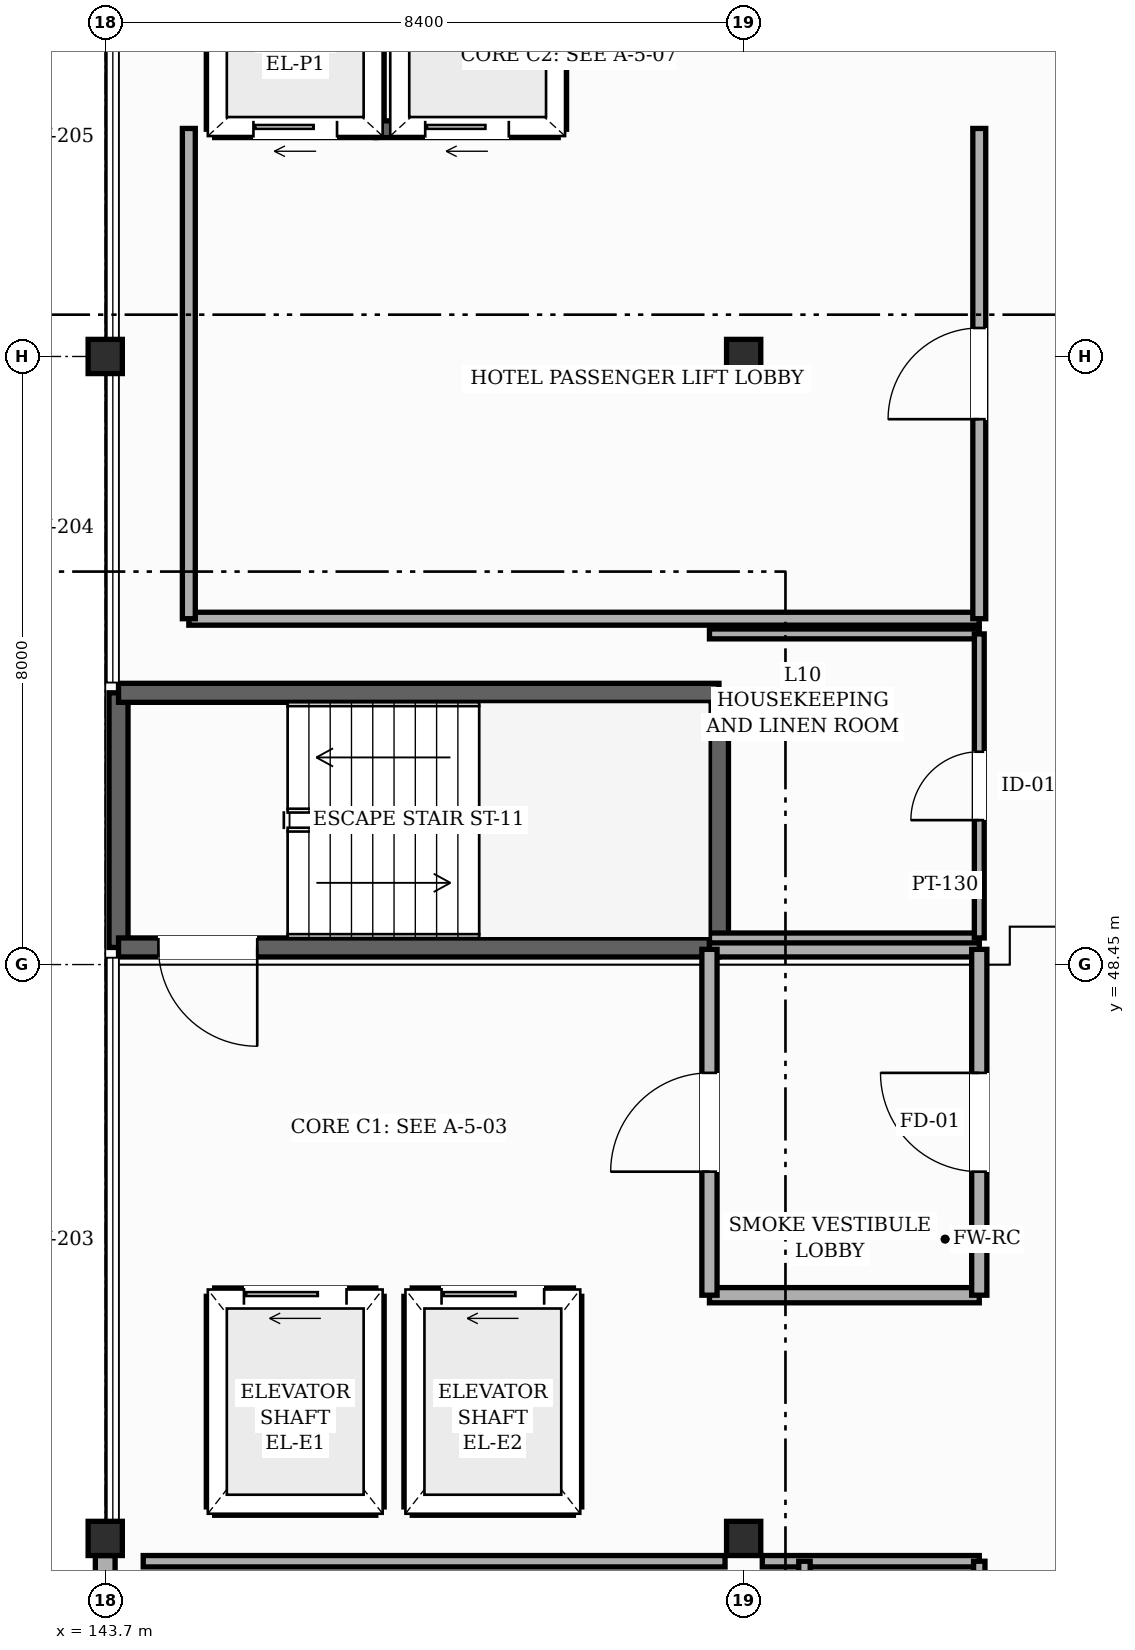
"""IFC4 building model, lengths in metres.
Left out: names, types, materials, properties, quantities, classifications, styles, units other than length and angle.
Written with IfcOpenShell. Run it as: python <this file> out.ifc"""

import sys

from ifc_helpers import new_model, si_unit, direction, frame, frame_2d, origin, origin_2d, place, context, subcontext, project, spatial, rectangle, hollow_rectangle, extrude, element, fill, save


model = new_model("IFC4")
c1 = context("Model", 3, precision=1e-05, world=origin(), true_north=direction((0.0, 1.0)))
c2 = subcontext(c1, "Body", "Model", "MODEL_VIEW")
j1 = project(units=[si_unit("LENGTHUNIT", "METRE"), si_unit("PLANEANGLEUNIT", "RADIAN")], contexts=[c1])
p1 = place(None, origin())
s1 = spatial("IfcSite", under=j1, at=p1, CompositionType="ELEMENT")
p2 = place(p1, origin())
s2 = spatial("IfcBuilding", under=s1, at=p2, CompositionType="ELEMENT")
p3 = place(p2, frame((0.0, 0.0, 42.6)))
s3 = spatial("IfcBuildingStorey", under=s2, at=p3, CompositionType="ELEMENT", Elevation=42.6)
for number, where, z_axis, x_axis in (
    (1, (143.7, 40.9, 0.0), (0.0, 0.0, 1.0), (1.0, 0.0, 0.0)),
    (2, (143.7, 56.45, 0.0), (0.0, 0.0, 1.0), (1.0, 0.0, 0.0)),
    (3, (152.1, 40.9, 0.0), (0.0, 0.0, 1.0), (1.0, 0.0, 0.0)),
    (4, (152.1, 56.45, 0.0), (0.0, 0.0, 1.0), (1.0, 0.0, 0.0)),
):
    element("IfcColumn", number, at=place(p3, frame(where, z_axis=z_axis, x_axis=x_axis)), inside=s3, PredefinedType="COLUMN", context=c2, shape_type="SweptSolid", body=[
        extrude(hollow_rectangle(XDim=0.45, YDim=0.45, WallThickness=0.019, InnerFilletRadius=0.019, OuterFilletRadius=0.038, at=origin_2d()), origin(), (0.0, 0.0, 1.0), 3.6),
    ])
p4 = place(p3, frame((143.7, 32.225, 0.0), z_axis=(0.0, 0.0, 1.0), x_axis=(0.0, 1.0, 0.0)))
e5 = element("IfcWall", 5, at=p4, inside=s3, PredefinedType="SOLIDWALL", context=c2, shape_type="SweptSolid", body=[
    extrude(rectangle(XDim=8.45, YDim=0.26, at=frame_2d((4.225, 0.0))), origin(), (0.0, 0.0, 1.0), 2.655),
])
p5 = place(p4, frame((0.875, 0.0, 0.85)))
e6 = element("IfcOpeningElement", 6, at=p5, cuts=e5, PredefinedType="OPENING", context=c2, shape_type="SweptSolid", body=[
    extrude(rectangle(XDim=2.25, YDim=1.35, at=frame_2d((1.125, 0.675))), frame((0.0, 0.14, 0.0), z_axis=(0.0, -1.0, 0.0), x_axis=(1.0, 0.0, 0.0)), (0.0, 0.0, 1.0), 0.28),
])
p6 = place(p4, frame((3.925, 0.0, 0.85)))
e7 = element("IfcOpeningElement", 7, at=p6, cuts=e5, PredefinedType="OPENING", context=c2, shape_type="SweptSolid", body=[
    extrude(rectangle(XDim=1.25, YDim=1.35, at=frame_2d((0.625, 0.675))), frame((0.0, 0.14, 0.0), z_axis=(0.0, -1.0, 0.0), x_axis=(1.0, 0.0, 0.0)), (0.0, 0.0, 1.0), 0.28),
])
p7 = place(p4, frame((6.375, 0.0, 0.85)))
e8 = element("IfcOpeningElement", 8, at=p7, cuts=e5, PredefinedType="OPENING", context=c2, shape_type="SweptSolid", body=[
    extrude(rectangle(XDim=1.45, YDim=1.35, at=frame_2d((0.725, 0.675))), frame((0.0, 0.14, 0.0), z_axis=(0.0, -1.0, 0.0), x_axis=(1.0, 0.0, 0.0)), (0.0, 0.0, 1.0), 0.28),
])
for number, where, z_axis, x_axis in (
    (9, (143.875, 48.675, 0.0), (0.0, 0.0, 1.0), (0.0, 1.0, 0.0)),
    (10, (151.775, 52.025, 0.0), (0.0, 0.0, 1.0), (0.0, -1.0, 0.0)),
):
    element("IfcWall", number, at=place(p3, frame(where, z_axis=z_axis, x_axis=x_axis)), inside=s3, PredefinedType="SHEAR", context=c2, shape_type="SweptSolid", body=[
        extrude(rectangle(XDim=3.35, YDim=0.25, at=frame_2d((1.675, 0.0))), origin(), (0.0, 0.0, 1.0), 3.38),
    ])
p8 = place(p3, frame((151.775, 48.675, 0.0), z_axis=(0.0, 0.0, 1.0), x_axis=(-1.0, 0.0, 0.0)))
e11 = element("IfcWall", 11, at=p8, inside=s3, PredefinedType="SHEAR", context=c2, shape_type="SweptSolid", body=[
    extrude(rectangle(XDim=7.9, YDim=0.25, at=frame_2d((3.95, 0.0))), origin(), (0.0, 0.0, 1.0), 3.38),
])
p9 = place(p8, frame((6.075, 0.0, 0.0)))
e12 = element("IfcOpeningElement", 12, at=p9, cuts=e11, PredefinedType="OPENING", context=c2, shape_type="SweptSolid", body=[
    extrude(rectangle(XDim=1.3, YDim=2.2, at=frame_2d((0.65, 1.1))), frame((0.0, 0.135, 0.0), z_axis=(0.0, -1.0, 0.0), x_axis=(1.0, 0.0, 0.0)), (0.0, 0.0, 1.0), 0.27),
])
p10 = place(p3, frame((143.875, 52.025, 0.0), z_axis=(0.0, 0.0, 1.0), x_axis=(1.0, 0.0, 0.0)))
e13 = element("IfcWall", 13, at=p10, inside=s3, PredefinedType="SHEAR", context=c2, shape_type="SweptSolid", body=[
    extrude(rectangle(XDim=7.9, YDim=0.25, at=frame_2d((3.95, 0.0))), origin(), (0.0, 0.0, 1.0), 3.38),
])
p11 = place(p3, frame((145.14, 44.085, 0.0), z_axis=(0.0, 0.0, 1.0), x_axis=(1.0, 0.0, 0.0)))
e14 = element("IfcWall", 14, at=p11, inside=s3, PredefinedType="SHEAR", context=c2, shape_type="SweptSolid", body=[
    extrude(rectangle(XDim=2.12, YDim=0.22, at=frame_2d((1.06, 0.0))), origin(), (0.0, 0.0, 1.0), 3.38),
])
p12 = place(p11, frame((0.385, 0.0, 0.0)))
e15 = element("IfcOpeningElement", 15, at=p12, cuts=e14, PredefinedType="OPENING", context=c2, shape_type="SweptSolid", body=[
    extrude(rectangle(XDim=1.35, YDim=2.3, at=frame_2d((0.675, 1.15))), frame((0.0, 0.12, 0.0), z_axis=(0.0, -1.0, 0.0), x_axis=(1.0, 0.0, 0.0)), (0.0, 0.0, 1.0), 0.24),
])
p13 = place(p3, frame((145.14, 41.315, 0.0), z_axis=(0.0, 0.0, 1.0), x_axis=(1.0, 0.0, 0.0)))
e16 = element("IfcWall", 16, at=p13, inside=s3, PredefinedType="SHEAR", context=c2, shape_type="SweptSolid", body=[
    extrude(rectangle(XDim=2.12, YDim=0.22, at=frame_2d((1.06, 0.0))), origin(), (0.0, 0.0, 1.0), 3.38),
])
for number, where, z_axis, x_axis in (
    (17, (147.26, 41.315, 0.0), (0.0, 0.0, 1.0), (0.0, 1.0, 0.0)),
    (18, (145.14, 41.315, 0.0), (0.0, 0.0, 1.0), (0.0, 1.0, 0.0)),
):
    element("IfcWall", number, at=place(p3, frame(where, z_axis=z_axis, x_axis=x_axis)), inside=s3, PredefinedType="SHEAR", context=c2, shape_type="SweptSolid", body=[
        extrude(rectangle(XDim=2.77, YDim=0.22, at=frame_2d((1.385, 0.0))), origin(), (0.0, 0.0, 1.0), 3.38),
    ])
p14 = place(p3, frame((147.74, 44.085, 0.0), z_axis=(0.0, 0.0, 1.0), x_axis=(1.0, 0.0, 0.0)))
e19 = element("IfcWall", 19, at=p14, inside=s3, PredefinedType="SHEAR", context=c2, shape_type="SweptSolid", body=[
    extrude(rectangle(XDim=2.12, YDim=0.22, at=frame_2d((1.06, 0.0))), origin(), (0.0, 0.0, 1.0), 3.38),
])
p15 = place(p14, frame((0.385, 0.0, 0.0)))
e20 = element("IfcOpeningElement", 20, at=p15, cuts=e19, PredefinedType="OPENING", context=c2, shape_type="SweptSolid", body=[
    extrude(rectangle(XDim=1.35, YDim=2.3, at=frame_2d((0.675, 1.15))), frame((0.0, 0.12, 0.0), z_axis=(0.0, -1.0, 0.0), x_axis=(1.0, 0.0, 0.0)), (0.0, 0.0, 1.0), 0.24),
])
p16 = place(p3, frame((147.74, 41.315, 0.0), z_axis=(0.0, 0.0, 1.0), x_axis=(1.0, 0.0, 0.0)))
e21 = element("IfcWall", 21, at=p16, inside=s3, PredefinedType="SHEAR", context=c2, shape_type="SweptSolid", body=[
    extrude(rectangle(XDim=2.12, YDim=0.22, at=frame_2d((1.06, 0.0))), origin(), (0.0, 0.0, 1.0), 3.38),
])
for number, where, z_axis, x_axis in (
    (22, (149.86, 41.315, 0.0), (0.0, 0.0, 1.0), (0.0, 1.0, 0.0)),
    (23, (147.74, 41.315, 0.0), (0.0, 0.0, 1.0), (0.0, 1.0, 0.0)),
):
    element("IfcWall", number, at=place(p3, frame(where, z_axis=z_axis, x_axis=x_axis)), inside=s3, PredefinedType="SHEAR", context=c2, shape_type="SweptSolid", body=[
        extrude(rectangle(XDim=2.77, YDim=0.22, at=frame_2d((1.385, 0.0))), origin(), (0.0, 0.0, 1.0), 3.38),
    ])
p17 = place(p3, frame((145.14, 59.44, 0.0), z_axis=(0.0, 0.0, 1.0), x_axis=(1.0, 0.0, 0.0)))
e24 = element("IfcWall", 24, at=p17, inside=s3, PredefinedType="SHEAR", context=c2, shape_type="SweptSolid", body=[
    extrude(rectangle(XDim=2.12, YDim=0.22, at=frame_2d((1.06, 0.0))), origin(), (0.0, 0.0, 1.0), 3.38),
])
p18 = place(p17, frame((0.51, 0.0, 0.0)))
e25 = element("IfcOpeningElement", 25, at=p18, cuts=e24, PredefinedType="OPENING", context=c2, shape_type="SweptSolid", body=[
    extrude(rectangle(XDim=1.1, YDim=2.2, at=frame_2d((0.55, 1.1))), frame((0.0, 0.12, 0.0), z_axis=(0.0, -1.0, 0.0), x_axis=(1.0, 0.0, 0.0)), (0.0, 0.0, 1.0), 0.24),
])
for number, where, z_axis, x_axis in (
    (26, (147.26, 59.44, 0.0), (0.0, 0.0, 1.0), (0.0, 1.0, 0.0)),
    (27, (145.14, 59.44, 0.0), (0.0, 0.0, 1.0), (0.0, 1.0, 0.0)),
):
    element("IfcWall", number, at=place(p3, frame(where, z_axis=z_axis, x_axis=x_axis)), inside=s3, PredefinedType="SHEAR", context=c2, shape_type="SweptSolid", body=[
        extrude(rectangle(XDim=1.92, YDim=0.22, at=frame_2d((0.96, 0.0))), origin(), (0.0, 0.0, 1.0), 3.38),
    ])
p19 = place(p3, frame((147.26, 59.44, 0.0), z_axis=(0.0, 0.0, 1.0), x_axis=(1.0, 0.0, 0.0)))
e28 = element("IfcWall", 28, at=p19, inside=s3, PredefinedType="SHEAR", context=c2, shape_type="SweptSolid", body=[
    extrude(rectangle(XDim=2.4, YDim=0.22, at=frame_2d((1.2, 0.0))), origin(), (0.0, 0.0, 1.0), 3.38),
])
p20 = place(p19, frame((0.65, 0.0, 0.0)))
e29 = element("IfcOpeningElement", 29, at=p20, cuts=e28, PredefinedType="OPENING", context=c2, shape_type="SweptSolid", body=[
    extrude(rectangle(XDim=1.1, YDim=2.2, at=frame_2d((0.55, 1.1))), frame((0.0, 0.12, 0.0), z_axis=(0.0, -1.0, 0.0), x_axis=(1.0, 0.0, 0.0)), (0.0, 0.0, 1.0), 0.24),
])
p21 = place(p3, frame((149.66, 59.44, 0.0), z_axis=(0.0, 0.0, 1.0), x_axis=(0.0, 1.0, 0.0)))
e30 = element("IfcWall", 30, at=p21, inside=s3, PredefinedType="SHEAR", context=c2, shape_type="SweptSolid", body=[
    extrude(rectangle(XDim=1.92, YDim=0.22, at=frame_2d((0.96, 0.0))), origin(), (0.0, 0.0, 1.0), 3.38),
])
p22 = place(p3, frame((144.2, 40.6, 0.0), z_axis=(0.0, 0.0, 1.0), x_axis=(1.0, 0.0, 0.0)))
e31 = element("IfcWall", 31, at=p22, inside=s3, PredefinedType="PARTITIONING", context=c2, shape_type="SweptSolid", body=[
    extrude(rectangle(XDim=7.655, YDim=0.15, at=frame_2d((3.828, 0.0))), origin(), (0.0, 0.0, 1.0), 2.755),
])
p23 = place(p3, frame((152.345, 40.6, 0.0), z_axis=(0.0, 0.0, 1.0), x_axis=(1.0, 0.0, 0.0)))
e32 = element("IfcWall", 32, at=p23, inside=s3, PredefinedType="PARTITIONING", context=c2, shape_type="SweptSolid", body=[
    extrude(rectangle(XDim=2.855, YDim=0.15, at=frame_2d((1.427, 0.0))), origin(), (0.0, 0.0, 1.0), 2.755),
])
for number, where, z_axis, x_axis in (
    (33, (151.65, 44.1, 0.0), (0.0, 0.0, 1.0), (1.0, 0.0, 0.0)),
    (34, (151.65, 48.65, 0.0), (0.0, 0.0, 1.0), (1.0, 0.0, 0.0)),
):
    element("IfcWall", number, at=place(p3, frame(where, z_axis=z_axis, x_axis=x_axis)), inside=s3, PredefinedType="SOLIDWALL", context=c2, shape_type="SweptSolid", body=[
        extrude(rectangle(XDim=3.55, YDim=0.2, at=frame_2d((1.775, 0.0))), origin(), (0.0, 0.0, 1.0), 3.365),
    ])
for number, where, z_axis, x_axis in (
    (35, (151.65, 48.8, 0.0), (0.0, 0.0, 1.0), (1.0, 0.0, 0.0)),
    (36, (151.65, 52.8, 0.0), (0.0, 0.0, 1.0), (1.0, 0.0, 0.0)),
):
    element("IfcWall", number, at=place(p3, frame(where, z_axis=z_axis, x_axis=x_axis)), inside=s3, PredefinedType="PARTITIONING", context=c2, shape_type="SweptSolid", body=[
        extrude(rectangle(XDim=3.55, YDim=0.13, at=frame_2d((1.775, 0.0))), origin(), (0.0, 0.0, 1.0), 3.365),
    ])
p24 = place(p3, frame((144.8, 53.0, 0.0), z_axis=(0.0, 0.0, 1.0), x_axis=(1.0, 0.0, 0.0)))
e37 = element("IfcWall", 37, at=p24, inside=s3, PredefinedType="PARTITIONING", context=c2, shape_type="SweptSolid", body=[
    extrude(rectangle(XDim=10.4, YDim=0.17, at=frame_2d((5.2, 0.0))), origin(), (0.0, 0.0, 1.0), 3.365),
])
p25 = place(p3, frame((144.8, 53.0, 0.0), z_axis=(0.0, 0.0, 1.0), x_axis=(0.0, 1.0, 0.0)))
e38 = element("IfcWall", 38, at=p25, inside=s3, PredefinedType="PARTITIONING", context=c2, shape_type="SweptSolid", body=[
    extrude(rectangle(XDim=6.45, YDim=0.17, at=frame_2d((3.225, 0.0))), origin(), (0.0, 0.0, 1.0), 3.365),
])
p26 = place(p3, frame((151.65, 44.1, 0.0), z_axis=(0.0, 0.0, 1.0), x_axis=(0.0, 1.0, 0.0)))
e39 = element("IfcWall", 39, at=p26, inside=s3, PredefinedType="SOLIDWALL", context=c2, shape_type="SweptSolid", body=[
    extrude(rectangle(XDim=4.55, YDim=0.2, at=frame_2d((2.275, 0.0))), origin(), (0.0, 0.0, 1.0), 3.365),
])
p27 = place(p26, frame((1.625, 0.0, 0.0)))
e40 = element("IfcOpeningElement", 40, at=p27, cuts=e39, PredefinedType="OPENING", context=c2, shape_type="SweptSolid", body=[
    extrude(rectangle(XDim=1.3, YDim=2.2, at=frame_2d((0.65, 1.1))), frame((0.0, 0.11, 0.0), z_axis=(0.0, -1.0, 0.0), x_axis=(1.0, 0.0, 0.0)), (0.0, 0.0, 1.0), 0.22),
])
p28 = place(p3, frame((152.9, 39.5, 0.0), z_axis=(0.0, 0.0, 1.0), x_axis=(0.0, 1.0, 0.0)))
e41 = element("IfcWall", 41, at=p28, inside=s3, PredefinedType="PARTITIONING", context=c2, shape_type="SweptSolid", body=[
    extrude(rectangle(XDim=1.1, YDim=0.15, at=frame_2d((0.55, 0.0))), origin(), (0.0, 0.0, 1.0), 3.365),
])
p29 = place(p3, frame((155.2, 30.4, 0.0), z_axis=(0.0, 0.0, 1.0), x_axis=(0.0, 1.0, 0.0)))
e42 = element("IfcWall", 42, at=p29, inside=s3, PredefinedType="PARTITIONING", context=c2, shape_type="SweptSolid", body=[
    extrude(rectangle(XDim=10.2, YDim=0.15, at=frame_2d((5.1, 0.0))), origin(), (0.0, 0.0, 1.0), 3.365),
])
p30 = place(p29, frame((0.175, 0.0, 0.0)))
e43 = element("IfcOpeningElement", 43, at=p30, cuts=e42, PredefinedType="OPENING", context=c2, shape_type="SweptSolid", body=[
    extrude(rectangle(XDim=1.1, YDim=2.2, at=frame_2d((0.55, 1.1))), frame((0.0, 0.085, 0.0), z_axis=(0.0, -1.0, 0.0), x_axis=(1.0, 0.0, 0.0)), (0.0, 0.0, 1.0), 0.17),
])
p31 = place(p29, frame((2.8, 0.0, 0.0)))
e44 = element("IfcOpeningElement", 44, at=p31, cuts=e42, PredefinedType="OPENING", context=c2, shape_type="SweptSolid", body=[
    extrude(rectangle(XDim=0.95, YDim=2.15, at=frame_2d((0.475, 1.075))), frame((0.0, 0.085, 0.0), z_axis=(0.0, -1.0, 0.0), x_axis=(1.0, 0.0, 0.0)), (0.0, 0.0, 1.0), 0.17),
])
p32 = place(p29, frame((5.35, 0.0, 0.0)))
e45 = element("IfcOpeningElement", 45, at=p32, cuts=e42, PredefinedType="OPENING", context=c2, shape_type="SweptSolid", body=[
    extrude(rectangle(XDim=0.95, YDim=2.15, at=frame_2d((0.475, 1.075))), frame((0.0, 0.085, 0.0), z_axis=(0.0, -1.0, 0.0), x_axis=(1.0, 0.0, 0.0)), (0.0, 0.0, 1.0), 0.17),
])
p33 = place(p29, frame((7.9, 0.0, 0.0)))
e46 = element("IfcOpeningElement", 46, at=p33, cuts=e42, PredefinedType="OPENING", context=c2, shape_type="SweptSolid", body=[
    extrude(rectangle(XDim=0.95, YDim=2.15, at=frame_2d((0.475, 1.075))), frame((0.0, 0.085, 0.0), z_axis=(0.0, -1.0, 0.0), x_axis=(1.0, 0.0, 0.0)), (0.0, 0.0, 1.0), 0.17),
])
p34 = place(p3, frame((155.2, 44.1, 0.0), z_axis=(0.0, 0.0, 1.0), x_axis=(0.0, 1.0, 0.0)))
e47 = element("IfcWall", 47, at=p34, inside=s3, PredefinedType="SOLIDWALL", context=c2, shape_type="SweptSolid", body=[
    extrude(rectangle(XDim=4.55, YDim=0.2, at=frame_2d((2.275, 0.0))), origin(), (0.0, 0.0, 1.0), 3.365),
])
p35 = place(p34, frame((1.625, 0.0, 0.0)))
e48 = element("IfcOpeningElement", 48, at=p35, cuts=e47, PredefinedType="OPENING", context=c2, shape_type="SweptSolid", body=[
    extrude(rectangle(XDim=1.3, YDim=2.2, at=frame_2d((0.65, 1.1))), frame((0.0, 0.11, 0.0), z_axis=(0.0, -1.0, 0.0), x_axis=(1.0, 0.0, 0.0)), (0.0, 0.0, 1.0), 0.22),
])
p36 = place(p3, frame((155.2, 48.8, 0.0), z_axis=(0.0, 0.0, 1.0), x_axis=(0.0, 1.0, 0.0)))
e49 = element("IfcWall", 49, at=p36, inside=s3, PredefinedType="PARTITIONING", context=c2, shape_type="SweptSolid", body=[
    extrude(rectangle(XDim=4.0, YDim=0.13, at=frame_2d((2.0, 0.0))), origin(), (0.0, 0.0, 1.0), 3.365),
])
p37 = place(p36, frame((1.55, 0.0, 0.0)))
e50 = element("IfcOpeningElement", 50, at=p37, cuts=e49, PredefinedType="OPENING", context=c2, shape_type="SweptSolid", body=[
    extrude(rectangle(XDim=0.9, YDim=2.15, at=frame_2d((0.45, 1.075))), frame((0.0, 0.075, 0.0), z_axis=(0.0, -1.0, 0.0), x_axis=(1.0, 0.0, 0.0)), (0.0, 0.0, 1.0), 0.15),
])
p38 = place(p3, frame((155.2, 53.0, 0.0), z_axis=(0.0, 0.0, 1.0), x_axis=(0.0, 1.0, 0.0)))
e51 = element("IfcWall", 51, at=p38, inside=s3, PredefinedType="PARTITIONING", context=c2, shape_type="SweptSolid", body=[
    extrude(rectangle(XDim=6.45, YDim=0.17, at=frame_2d((3.225, 0.0))), origin(), (0.0, 0.0, 1.0), 3.365),
])
p39 = place(p38, frame((2.625, 0.0, 0.0)))
e52 = element("IfcOpeningElement", 52, at=p39, cuts=e51, PredefinedType="OPENING", context=c2, shape_type="SweptSolid", body=[
    extrude(rectangle(XDim=1.2, YDim=2.2, at=frame_2d((0.6, 1.1))), frame((0.0, 0.095, 0.0), z_axis=(0.0, -1.0, 0.0), x_axis=(1.0, 0.0, 0.0)), (0.0, 0.0, 1.0), 0.19),
])
p40 = place(p9, origin())
e53 = element("IfcDoor", 53, at=p40, inside=s3, OperationType="SINGLE_SWING_LEFT", PredefinedType="DOOR", context=c2, shape_type="SweptSolid", body=[
    extrude(rectangle(XDim=1.3, YDim=2.2, at=frame_2d((0.65, 1.1))), frame((0.0, 0.025, 0.0), z_axis=(0.0, -1.0, 0.0), x_axis=(1.0, 0.0, 0.0)), (0.0, 0.0, 1.0), 0.05),
])
fill(e12, e53)
p41 = place(p12, origin())
e54 = element("IfcDoor", 54, at=p41, inside=s3, OperationType="SLIDING_TO_LEFT", PredefinedType="DOOR", context=c2, shape_type="SweptSolid", body=[
    extrude(rectangle(XDim=1.35, YDim=2.3, at=frame_2d((0.675, 1.15))), frame((0.0, 0.025, 0.0), z_axis=(0.0, -1.0, 0.0), x_axis=(1.0, 0.0, 0.0)), (0.0, 0.0, 1.0), 0.05),
])
fill(e15, e54)
p42 = place(p15, origin())
e55 = element("IfcDoor", 55, at=p42, inside=s3, OperationType="SLIDING_TO_LEFT", PredefinedType="DOOR", context=c2, shape_type="SweptSolid", body=[
    extrude(rectangle(XDim=1.35, YDim=2.3, at=frame_2d((0.675, 1.15))), frame((0.0, 0.025, 0.0), z_axis=(0.0, -1.0, 0.0), x_axis=(1.0, 0.0, 0.0)), (0.0, 0.0, 1.0), 0.05),
])
fill(e20, e55)
p43 = place(p18, origin())
e56 = element("IfcDoor", 56, at=p43, inside=s3, OperationType="SLIDING_TO_LEFT", PredefinedType="DOOR", context=c2, shape_type="SweptSolid", body=[
    extrude(rectangle(XDim=1.1, YDim=2.2, at=frame_2d((0.55, 1.1))), frame((0.0, 0.025, 0.0), z_axis=(0.0, -1.0, 0.0), x_axis=(1.0, 0.0, 0.0)), (0.0, 0.0, 1.0), 0.05),
])
fill(e25, e56)
p44 = place(p20, origin())
e57 = element("IfcDoor", 57, at=p44, inside=s3, OperationType="SLIDING_TO_LEFT", PredefinedType="DOOR", context=c2, shape_type="SweptSolid", body=[
    extrude(rectangle(XDim=1.1, YDim=2.2, at=frame_2d((0.55, 1.1))), frame((0.0, 0.025, 0.0), z_axis=(0.0, -1.0, 0.0), x_axis=(1.0, 0.0, 0.0)), (0.0, 0.0, 1.0), 0.05),
])
fill(e29, e57)
p45 = place(p27, origin())
e58 = element("IfcDoor", 58, at=p45, inside=s3, OperationType="SINGLE_SWING_LEFT", PredefinedType="DOOR", context=c2, shape_type="SweptSolid", body=[
    extrude(rectangle(XDim=1.3, YDim=2.2, at=frame_2d((0.65, 1.1))), frame((0.0, 0.025, 0.0), z_axis=(0.0, -1.0, 0.0), x_axis=(1.0, 0.0, 0.0)), (0.0, 0.0, 1.0), 0.05),
])
fill(e40, e58)
p46 = place(p35, origin())
e59 = element("IfcDoor", 59, at=p46, inside=s3, OperationType="SINGLE_SWING_RIGHT", PredefinedType="DOOR", context=c2, shape_type="SweptSolid", body=[
    extrude(rectangle(XDim=1.3, YDim=2.2, at=frame_2d((0.65, 1.1))), frame((0.0, 0.025, 0.0), z_axis=(0.0, -1.0, 0.0), x_axis=(1.0, 0.0, 0.0)), (0.0, 0.0, 1.0), 0.05),
])
fill(e48, e59)
p47 = place(p39, origin())
e60 = element("IfcDoor", 60, at=p47, inside=s3, OperationType="SINGLE_SWING_LEFT", PredefinedType="DOOR", context=c2, shape_type="SweptSolid", body=[
    extrude(rectangle(XDim=1.2, YDim=2.2, at=frame_2d((0.6, 1.1))), frame((0.0, 0.025, 0.0), z_axis=(0.0, -1.0, 0.0), x_axis=(1.0, 0.0, 0.0)), (0.0, 0.0, 1.0), 0.05),
])
fill(e52, e60)
p48 = place(p37, origin())
e61 = element("IfcDoor", 61, at=p48, inside=s3, OperationType="SINGLE_SWING_LEFT", PredefinedType="DOOR", context=c2, shape_type="SweptSolid", body=[
    extrude(rectangle(XDim=0.9, YDim=2.15, at=frame_2d((0.45, 1.075))), frame((0.0, 0.025, 0.0), z_axis=(0.0, -1.0, 0.0), x_axis=(1.0, 0.0, 0.0)), (0.0, 0.0, 1.0), 0.05),
])
fill(e50, e61)
save(model, sys.argv[1])
